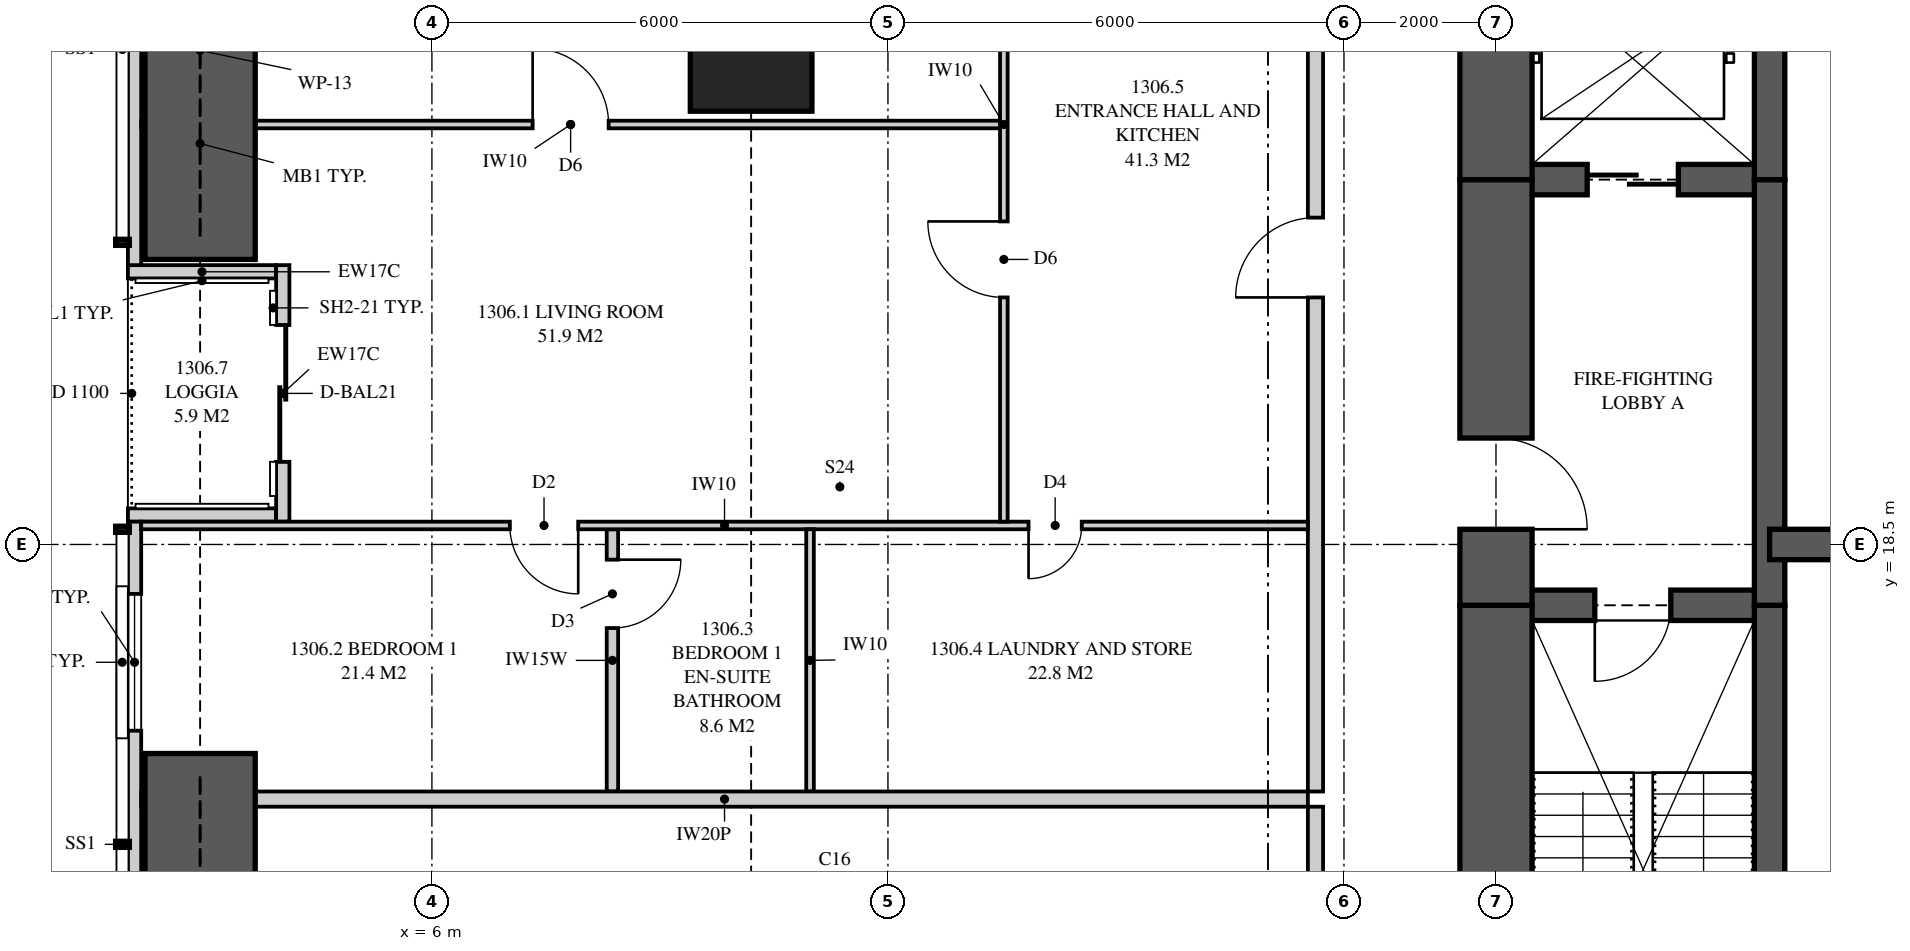
"""IFC4 building model, lengths in metres.
Left out: names, types, materials, properties, quantities, classifications, styles, units other than length and angle.
Written with IfcOpenShell. Run it as: python <this file> out.ifc"""

import sys

from ifc_helpers import new_model, si_unit, direction, frame, frame_2d, origin, origin_2d, place, context, subcontext, project, spatial, polyline, rectangle, outline, extrude, element, fill, save


model = new_model("IFC4")
c1 = context("Model", 3, precision=1e-05, world=origin(), true_north=direction((0.0, 1.0)))
c2 = subcontext(c1, "Body", "Model", "MODEL_VIEW")
j1 = project(units=[si_unit("LENGTHUNIT", "METRE"), si_unit("PLANEANGLEUNIT", "RADIAN")], contexts=[c1])
p1 = place(None, origin())
s1 = spatial("IfcSite", under=j1, at=p1, CompositionType="ELEMENT")
p2 = place(p1, origin())
s2 = spatial("IfcBuilding", under=s1, at=p2, CompositionType="ELEMENT")
p3 = place(p2, frame((0.0, 0.0, 51.15)))
s3 = spatial("IfcBuildingStorey", under=s2, at=p3, CompositionType="ELEMENT", Elevation=51.15)
p4 = place(p3, frame((10.2, 25.0, 0.0), z_axis=(0.0, 0.0, 1.0), x_axis=(1.0, 0.0, 0.0)))
e1 = element("IfcColumn", 1, at=p4, inside=s3, PredefinedType="COLUMN", context=c2, shape_type="SweptSolid", body=[
    extrude(rectangle(XDim=1.6, YDim=1.6, at=origin_2d()), origin(), (0.0, 0.0, 1.0), 3.35),
])
p5 = place(p3, frame((20.0, 26.05, 0.0), z_axis=(0.0, 0.0, 1.0), x_axis=(0.0, -1.0, 0.0)))
e2 = element("IfcWall", 2, at=p5, inside=s3, PredefinedType="SHEAR", context=c2, shape_type="SweptSolid", body=[
    extrude(rectangle(XDim=2.75, YDim=0.95, at=frame_2d((1.375, 0.0))), origin(), (0.0, 0.0, 1.0), 3.35),
])
p6 = place(p3, frame((20.0, 23.3, 0.0), z_axis=(0.0, 0.0, 1.0), x_axis=(0.0, -1.0, 0.0)))
e3 = element("IfcWall", 3, at=p6, inside=s3, PredefinedType="SHEAR", context=c2, shape_type="SweptSolid", body=[
    extrude(rectangle(XDim=5.6, YDim=0.95, at=frame_2d((2.8, 0.0))), origin(), (0.0, 0.0, 1.0), 3.35),
])
p7 = place(p6, frame((3.4, 0.0, 0.0)))
e4 = element("IfcOpeningElement", 4, at=p7, cuts=e3, PredefinedType="OPENING", context=c2, shape_type="SweptSolid", body=[
    extrude(rectangle(XDim=1.2, YDim=2.2, at=frame_2d((0.6, 1.1))), frame((0.0, 0.485, 0.0), z_axis=(0.0, -1.0, 0.0), x_axis=(1.0, 0.0, 0.0)), (0.0, 0.0, 1.0), 0.97),
])
p8 = place(p3, frame((20.0, 17.7, 0.0), z_axis=(0.0, 0.0, 1.0), x_axis=(0.0, -1.0, 0.0)))
e5 = element("IfcWall", 5, at=p8, inside=s3, PredefinedType="SHEAR", context=c2, shape_type="SweptSolid", body=[
    extrude(rectangle(XDim=4.7, YDim=0.95, at=frame_2d((2.35, 0.0))), origin(), (0.0, 0.0, 1.0), 3.35),
])
p9 = place(p3, frame((23.6, 10.95, 0.0), z_axis=(0.0, 0.0, 1.0), x_axis=(0.0, 1.0, 0.0)))
e6 = element("IfcWall", 6, at=p9, inside=s3, PredefinedType="SHEAR", context=c2, shape_type="SweptSolid", body=[
    extrude(rectangle(XDim=6.75, YDim=0.4, at=frame_2d((3.375, 0.0))), origin(), (0.0, 0.0, 1.0), 3.35),
])
p10 = place(p3, frame((23.6, 17.7, 0.0), z_axis=(0.0, 0.0, 1.0), x_axis=(0.0, 1.0, 0.0)))
e7 = element("IfcWall", 7, at=p10, inside=s3, PredefinedType="SHEAR", context=c2, shape_type="SweptSolid", body=[
    extrude(rectangle(XDim=5.6, YDim=0.4, at=frame_2d((2.8, 0.0))), origin(), (0.0, 0.0, 1.0), 3.35),
])
p11 = place(p3, frame((23.6, 23.3, 0.0), z_axis=(0.0, 0.0, 1.0), x_axis=(0.0, 1.0, 0.0)))
e8 = element("IfcWall", 8, at=p11, inside=s3, PredefinedType="SHEAR", context=c2, shape_type="SweptSolid", body=[
    extrude(rectangle(XDim=2.75, YDim=0.4, at=frame_2d((1.375, 0.0))), origin(), (0.0, 0.0, 1.0), 3.35),
])
p12 = place(p3, frame((20.0, 17.7, 0.0), z_axis=(0.0, 0.0, 1.0), x_axis=(1.0, 0.0, 0.0)))
e9 = element("IfcWall", 9, at=p12, inside=s3, PredefinedType="SHEAR", context=c2, shape_type="SweptSolid", body=[
    extrude(rectangle(XDim=3.6, YDim=0.4, at=frame_2d((1.8, 0.0))), origin(), (0.0, 0.0, 1.0), 3.35),
])
p13 = place(p12, frame((1.3, 0.0, 0.0)))
e10 = element("IfcOpeningElement", 10, at=p13, cuts=e9, PredefinedType="OPENING", context=c2, shape_type="SweptSolid", body=[
    extrude(rectangle(XDim=1.0, YDim=2.1, at=frame_2d((0.5, 1.05))), frame((0.0, 0.21, 0.0), z_axis=(0.0, -1.0, 0.0), x_axis=(1.0, 0.0, 0.0)), (0.0, 0.0, 1.0), 0.42),
])
p14 = place(p3, frame((20.0, 23.3, 0.0), z_axis=(0.0, 0.0, 1.0), x_axis=(1.0, 0.0, 0.0)))
e11 = element("IfcWall", 11, at=p14, inside=s3, PredefinedType="SHEAR", context=c2, shape_type="SweptSolid", body=[
    extrude(rectangle(XDim=3.6, YDim=0.4, at=frame_2d((1.8, 0.0))), origin(), (0.0, 0.0, 1.0), 3.35),
])
p15 = place(p14, frame((1.2, 0.0, 0.0)))
e12 = element("IfcOpeningElement", 12, at=p15, cuts=e11, PredefinedType="OPENING", context=c2, shape_type="SweptSolid", body=[
    extrude(rectangle(XDim=1.2, YDim=2.1, at=frame_2d((0.6, 1.05))), frame((0.0, 0.21, 0.0), z_axis=(0.0, -1.0, 0.0), x_axis=(1.0, 0.0, 0.0)), (0.0, 0.0, 1.0), 0.42),
])
p16 = place(p3, frame((23.6, 18.5, 0.0), z_axis=(0.0, 0.0, 1.0), x_axis=(1.0, 0.0, 0.0)))
e13 = element("IfcWall", 13, at=p16, inside=s3, PredefinedType="SHEAR", context=c2, shape_type="SweptSolid", body=[
    extrude(rectangle(XDim=2.4, YDim=0.4, at=frame_2d((1.2, 0.0))), origin(), (0.0, 0.0, 1.0), 3.35),
])
p17 = place(p3, frame((2.087, 34.949, 0.0), z_axis=(0.0, 0.0, 1.0), x_axis=(0.0, -1.0, 0.0)))
e14 = element("IfcWall", 14, at=p17, inside=s3, PredefinedType="SOLIDWALL", context=c2, shape_type="SweptSolid", body=[
    extrude(outline(polyline([(0.0, 0.0), (12.774, 0.0), (12.774, 2.15), (9.949, 2.15), (9.949, 3.11), (9.823, 3.11), (9.823, 2.15), (9.73, 2.15), (9.73, 3.11), (0.0, 3.11), (0.0, 0.0)])), frame((0.0, 0.087, 0.0), z_axis=(0.0, -1.0, 0.0), x_axis=(1.0, 0.0, 0.0)), (0.0, 0.0, 1.0), 0.175),
])
p18 = place(p17, frame((2.722, 0.0, 0.4)))
e15 = element("IfcOpeningElement", 15, at=p18, cuts=e14, PredefinedType="OPENING", context=c2, shape_type="SweptSolid", body=[
    extrude(rectangle(XDim=1.8, YDim=1.7, at=frame_2d((0.9, 0.85))), frame((0.0, 0.097, 0.0), z_axis=(0.0, -1.0, 0.0), x_axis=(1.0, 0.0, 0.0)), (0.0, 0.0, 1.0), 0.195),
])
p19 = place(p17, frame((5.899, 0.0, 0.4)))
e16 = element("IfcOpeningElement", 16, at=p19, cuts=e14, PredefinedType="OPENING", context=c2, shape_type="SweptSolid", body=[
    extrude(rectangle(XDim=1.2, YDim=1.7, at=frame_2d((0.6, 0.85))), frame((0.0, 0.097, 0.0), z_axis=(0.0, -1.0, 0.0), x_axis=(1.0, 0.0, 0.0)), (0.0, 0.0, 1.0), 0.195),
])
p20 = place(p3, frame((2.087, 18.8, 0.0), z_axis=(0.0, 0.0, 1.0), x_axis=(0.0, -1.0, 0.0)))
e17 = element("IfcWall", 17, at=p20, inside=s3, PredefinedType="SOLIDWALL", context=c2, shape_type="SweptSolid", body=[
    extrude(outline(polyline([(0.0, 0.0), (15.749, 0.0), (15.749, 3.11), (6.019, 3.11), (6.019, 2.15), (5.926, 2.15), (5.926, 3.11), (5.8, 3.11), (5.8, 2.15), (0.0, 2.15), (0.0, 0.0)])), frame((0.0, 0.087, 0.0), z_axis=(0.0, -1.0, 0.0), x_axis=(1.0, 0.0, 0.0)), (0.0, 0.0, 1.0), 0.175),
])
p21 = place(p20, frame((0.95, 0.0, 0.4)))
e18 = element("IfcOpeningElement", 18, at=p21, cuts=e17, PredefinedType="OPENING", context=c2, shape_type="SweptSolid", body=[
    extrude(rectangle(XDim=1.8, YDim=1.7, at=frame_2d((0.9, 0.85))), frame((0.0, 0.097, 0.0), z_axis=(0.0, -1.0, 0.0), x_axis=(1.0, 0.0, 0.0)), (0.0, 0.0, 1.0), 0.195),
])
p22 = place(p20, frame((8.69, 0.0, 0.4)))
e19 = element("IfcOpeningElement", 19, at=p22, cuts=e17, PredefinedType="OPENING", context=c2, shape_type="SweptSolid", body=[
    extrude(rectangle(XDim=1.2, YDim=1.7, at=frame_2d((0.6, 0.85))), frame((0.0, 0.097, 0.0), z_axis=(0.0, -1.0, 0.0), x_axis=(1.0, 0.0, 0.0)), (0.0, 0.0, 1.0), 0.195),
])
p23 = place(p20, frame((11.727, 0.0, 0.4)))
e20 = element("IfcOpeningElement", 20, at=p23, cuts=e17, PredefinedType="OPENING", context=c2, shape_type="SweptSolid", body=[
    extrude(rectangle(XDim=1.8, YDim=1.7, at=frame_2d((0.9, 0.85))), frame((0.0, 0.097, 0.0), z_axis=(0.0, -1.0, 0.0), x_axis=(1.0, 0.0, 0.0)), (0.0, 0.0, 1.0), 0.195),
])
p24 = place(p3, frame((4.038, 22.175, 0.0), z_axis=(0.0, 0.0, 1.0), x_axis=(0.0, -1.0, 0.0)))
e21 = element("IfcWall", 21, at=p24, inside=s3, PredefinedType="SOLIDWALL", context=c2, shape_type="SweptSolid", body=[
    extrude(rectangle(XDim=3.375, YDim=0.175, at=frame_2d((1.688, 0.0))), origin(), (0.0, 0.0, 1.0), 3.11),
])
p25 = place(p24, frame((0.788, 0.0, 0.0)))
e22 = element("IfcOpeningElement", 22, at=p25, cuts=e21, PredefinedType="OPENING", context=c2, shape_type="SweptSolid", body=[
    extrude(rectangle(XDim=1.8, YDim=2.1, at=frame_2d((0.9, 1.05))), frame((0.0, 0.097, 0.0), z_axis=(0.0, -1.0, 0.0), x_axis=(1.0, 0.0, 0.0)), (0.0, 0.0, 1.0), 0.195),
])
for number, where, z_axis, x_axis in (
    (23, (2.0, 22.087, 0.0), (0.0, 0.0, 1.0), (1.0, 0.0, 0.0)),
    (24, (2.0, 18.887, 0.0), (0.0, 0.0, 1.0), (1.0, 0.0, 0.0)),
):
    element("IfcWall", number, at=place(p3, frame(where, z_axis=z_axis, x_axis=x_axis)), inside=s3, PredefinedType="SOLIDWALL", context=c2, shape_type="SweptSolid", body=[
        extrude(outline(polyline([(0.0, 0.0), (1.95, 0.0), (1.95, 3.11), (1.75, 3.11), (1.75, 2.15), (0.15, 2.15), (0.15, 3.11), (0.0, 3.11), (0.0, 0.0)])), frame((0.0, 0.087, 0.0), z_axis=(0.0, -1.0, 0.0), x_axis=(1.0, 0.0, 0.0)), (0.0, 0.0, 1.0), 0.175),
    ])
p26 = place(p3, frame((2.175, 15.15, 0.0), z_axis=(0.0, 0.0, 1.0), x_axis=(1.0, 0.0, 0.0)))
e25 = element("IfcWall", 25, at=p26, inside=s3, PredefinedType="PARTITIONING", context=c2, shape_type="SweptSolid", body=[
    extrude(outline(polyline([(0.529, 2.15), (0.0, 2.15), (0.0, 0.0), (0.529, 0.0), (0.529, 0.034), (1.021, 0.034), (1.021, 0.0), (15.35, 0.0), (15.35, 3.11), (9.335, 3.11), (9.335, 2.51), (6.715, 2.51), (6.715, 3.11), (1.685, 3.11), (1.685, 2.15), (1.021, 2.15), (1.021, 2.116), (0.529, 2.116), (0.529, 2.15)])), frame((0.0, 0.1, 0.0), z_axis=(0.0, -1.0, 0.0), x_axis=(1.0, 0.0, 0.0)), (0.0, 0.0, 1.0), 0.2),
])
p27 = place(p3, frame((17.625, 15.25, 0.0), z_axis=(0.0, 0.0, 1.0), x_axis=(0.0, 1.0, 0.0)))
e26 = element("IfcWall", 26, at=p27, inside=s3, PredefinedType="PARTITIONING", context=c2, shape_type="SweptSolid", body=[
    extrude(outline(polyline([(0.0, 0.0), (14.0, 0.0), (14.0, 3.11), (10.087, 3.11), (10.087, 2.541), (9.413, 2.541), (9.413, 3.11), (0.0, 3.11), (0.0, 0.0)])), frame((0.0, 0.1, 0.0), z_axis=(0.0, -1.0, 0.0), x_axis=(1.0, 0.0, 0.0)), (0.0, 0.0, 1.0), 0.2),
])
p28 = place(p27, frame((6.5, 0.0, 0.0)))
e27 = element("IfcOpeningElement", 27, at=p28, cuts=e26, PredefinedType="OPENING", context=c2, shape_type="SweptSolid", body=[
    extrude(rectangle(XDim=1.05, YDim=2.2, at=frame_2d((0.525, 1.1))), frame((0.0, 0.11, 0.0), z_axis=(0.0, -1.0, 0.0), x_axis=(1.0, 0.0, 0.0)), (0.0, 0.0, 1.0), 0.22),
])
p29 = place(p3, frame((2.175, 18.75, 0.0), z_axis=(0.0, 0.0, 1.0), x_axis=(1.0, 0.0, 0.0)))
e28 = element("IfcWall", 28, at=p29, inside=s3, PredefinedType="PARTITIONING", context=c2, shape_type="SweptSolid", body=[
    extrude(outline(polyline([(0.0, 0.0), (15.35, 0.0), (15.35, 3.11), (9.285, 3.11), (9.285, 2.51), (6.765, 2.51), (6.765, 3.11), (1.635, 3.11), (1.635, 2.15), (0.0, 2.15), (0.0, 3.11), (0.0, 0.0)])), frame((0.0, 0.05, 0.0), z_axis=(0.0, -1.0, 0.0), x_axis=(1.0, 0.0, 0.0)), (0.0, 0.0, 1.0), 0.1),
])
p30 = place(p29, frame((4.85, 0.0, 0.0)))
e29 = element("IfcOpeningElement", 29, at=p30, cuts=e28, PredefinedType="OPENING", context=c2, shape_type="SweptSolid", body=[
    extrude(rectangle(XDim=0.9, YDim=2.1, at=frame_2d((0.45, 1.05))), frame((0.0, 0.06, 0.0), z_axis=(0.0, -1.0, 0.0), x_axis=(1.0, 0.0, 0.0)), (0.0, 0.0, 1.0), 0.12),
])
p31 = place(p29, frame((11.675, 0.0, 0.0)))
e30 = element("IfcOpeningElement", 30, at=p31, cuts=e28, PredefinedType="OPENING", context=c2, shape_type="SweptSolid", body=[
    extrude(rectangle(XDim=0.7, YDim=2.1, at=frame_2d((0.35, 1.05))), frame((0.0, 0.06, 0.0), z_axis=(0.0, -1.0, 0.0), x_axis=(1.0, 0.0, 0.0)), (0.0, 0.0, 1.0), 0.12),
])
p32 = place(p3, frame((8.375, 15.25, 0.0), z_axis=(0.0, 0.0, 1.0), x_axis=(0.0, 1.0, 0.0)))
e31 = element("IfcWall", 31, at=p32, inside=s3, PredefinedType="PLUMBINGWALL", context=c2, shape_type="SweptSolid", body=[
    extrude(rectangle(XDim=3.45, YDim=0.15, at=frame_2d((1.725, 0.0))), origin(), (0.0, 0.0, 1.0), 3.11),
])
p33 = place(p32, frame((2.15, 0.0, 0.0)))
e32 = element("IfcOpeningElement", 32, at=p33, cuts=e31, PredefinedType="OPENING", context=c2, shape_type="SweptSolid", body=[
    extrude(rectangle(XDim=0.9, YDim=2.1, at=frame_2d((0.45, 1.05))), frame((0.0, 0.085, 0.0), z_axis=(0.0, -1.0, 0.0), x_axis=(1.0, 0.0, 0.0)), (0.0, 0.0, 1.0), 0.17),
])
p34 = place(p3, frame((10.975, 15.25, 0.0), z_axis=(0.0, 0.0, 1.0), x_axis=(0.0, 1.0, 0.0)))
e33 = element("IfcWall", 33, at=p34, inside=s3, PredefinedType="PARTITIONING", context=c2, shape_type="SweptSolid", body=[
    extrude(outline(polyline([(0.0, 0.0), (3.45, 0.0), (3.45, 3.11), (3.45, 2.51), (0.0, 2.51), (0.0, 3.11), (0.0, 0.0)])), frame((0.0, 0.05, 0.0), z_axis=(0.0, -1.0, 0.0), x_axis=(1.0, 0.0, 0.0)), (0.0, 0.0, 1.0), 0.1),
])
p35 = place(p3, frame((13.525, 18.8, 0.0), z_axis=(0.0, 0.0, 1.0), x_axis=(0.0, 1.0, 0.0)))
e34 = element("IfcWall", 34, at=p35, inside=s3, PredefinedType="PARTITIONING", context=c2, shape_type="SweptSolid", body=[
    extrude(outline(polyline([(0.0, 0.0), (10.45, 0.0), (10.45, 3.11), (6.487, 3.11), (6.487, 2.541), (5.913, 2.541), (5.913, 3.11), (0.0, 3.11), (0.0, 0.0)])), frame((0.0, 0.05, 0.0), z_axis=(0.0, -1.0, 0.0), x_axis=(1.0, 0.0, 0.0)), (0.0, 0.0, 1.0), 0.1),
])
p36 = place(p35, frame((2.95, 0.0, 0.0)))
e35 = element("IfcOpeningElement", 35, at=p36, cuts=e34, PredefinedType="OPENING", context=c2, shape_type="SweptSolid", body=[
    extrude(rectangle(XDim=1.0, YDim=2.1, at=frame_2d((0.5, 1.05))), frame((0.0, 0.06, 0.0), z_axis=(0.0, -1.0, 0.0), x_axis=(1.0, 0.0, 0.0)), (0.0, 0.0, 1.0), 0.12),
])
p37 = place(p3, frame((2.175, 24.025, 0.0), z_axis=(0.0, 0.0, 1.0), x_axis=(1.0, 0.0, 0.0)))
e36 = element("IfcWall", 36, at=p37, inside=s3, PredefinedType="PARTITIONING", context=c2, shape_type="SweptSolid", body=[
    extrude(outline(polyline([(0.529, 2.15), (0.0, 2.15), (0.0, 0.0), (0.529, 0.0), (0.529, 0.803), (1.021, 0.803), (1.021, 0.0), (11.3, 0.0), (11.3, 3.11), (9.285, 3.11), (9.285, 2.51), (6.765, 2.51), (6.765, 3.11), (1.635, 3.11), (1.635, 2.15), (1.021, 2.15), (1.021, 1.347), (0.529, 1.347), (0.529, 2.15)])), frame((0.0, 0.05, 0.0), z_axis=(0.0, -1.0, 0.0), x_axis=(1.0, 0.0, 0.0)), (0.0, 0.0, 1.0), 0.1),
])
p38 = place(p37, frame((5.15, 0.0, 0.0)))
e37 = element("IfcOpeningElement", 37, at=p38, cuts=e36, PredefinedType="OPENING", context=c2, shape_type="SweptSolid", body=[
    extrude(rectangle(XDim=1.0, YDim=2.1, at=frame_2d((0.5, 1.05))), frame((0.0, 0.06, 0.0), z_axis=(0.0, -1.0, 0.0), x_axis=(1.0, 0.0, 0.0)), (0.0, 0.0, 1.0), 0.12),
])
p39 = place(p3, frame((17.625, 13.6, 0.0), z_axis=(0.0, 0.0, 1.0), x_axis=(0.0, 1.0, 0.0)))
e38 = element("IfcWall", 38, at=p39, inside=s3, PredefinedType="PARTITIONING", context=c2, shape_type="SweptSolid", body=[
    extrude(rectangle(XDim=1.45, YDim=0.2, at=frame_2d((0.725, 0.0))), origin(), (0.0, 0.0, 1.0), 3.11),
])
for number, where, z_axis, x_axis in (
    (39, (2.95, 22.25, 0.0), (0.0, 0.0, 1.0), (0.0, 1.0, 0.0)),
    (40, (2.95, 10.25, 0.0), (0.0, 0.0, 1.0), (0.0, 1.0, 0.0)),
):
    element("IfcWall", number, at=place(p3, frame(where, z_axis=z_axis, x_axis=x_axis)), inside=s3, PredefinedType="SHEAR", context=c2, shape_type="SweptSolid", body=[
        extrude(rectangle(XDim=5.5, YDim=1.45, at=frame_2d((2.75, 0.0))), origin(), (0.0, 0.0, 1.0), 3.35),
    ])
p40 = place(p25, origin())
e41 = element("IfcDoor", 41, at=p40, inside=s3, OperationType="SLIDING_TO_LEFT", PredefinedType="DOOR", context=c2, shape_type="SweptSolid", body=[
    extrude(rectangle(XDim=1.8, YDim=2.1, at=frame_2d((0.9, 1.05))), frame((0.0, 0.025, 0.0), z_axis=(0.0, -1.0, 0.0), x_axis=(1.0, 0.0, 0.0)), (0.0, 0.0, 1.0), 0.05),
])
fill(e22, e41)
p41 = place(p21, origin())
e42 = element("IfcWindow", 42, at=p41, inside=s3, PartitioningType="SINGLE_PANEL", PredefinedType="WINDOW", context=c2, shape_type="SweptSolid", body=[
    extrude(rectangle(XDim=1.8, YDim=1.7, at=frame_2d((0.9, 0.85))), frame((0.0, 0.03, 0.0), z_axis=(0.0, -1.0, 0.0), x_axis=(1.0, 0.0, 0.0)), (0.0, 0.0, 1.0), 0.06),
])
fill(e18, e42)
p42 = place(p28, origin())
e43 = element("IfcDoor", 43, at=p42, inside=s3, OperationType="SINGLE_SWING_LEFT", PredefinedType="DOOR", context=c2, shape_type="SweptSolid", body=[
    extrude(rectangle(XDim=1.05, YDim=2.2, at=frame_2d((0.525, 1.1))), frame((0.0, 0.025, 0.0), z_axis=(0.0, -1.0, 0.0), x_axis=(1.0, 0.0, 0.0)), (0.0, 0.0, 1.0), 0.05),
])
fill(e27, e43)
p43 = place(p30, frame((0.9, 0.0, 0.0), z_axis=(0.0, 0.0, 1.0), x_axis=(-1.0, 0.0, 0.0)))
e44 = element("IfcDoor", 44, at=p43, inside=s3, OperationType="SINGLE_SWING_LEFT", PredefinedType="DOOR", context=c2, shape_type="SweptSolid", body=[
    extrude(rectangle(XDim=0.9, YDim=2.1, at=frame_2d((0.45, 1.05))), frame((0.0, 0.025, 0.0), z_axis=(0.0, -1.0, 0.0), x_axis=(1.0, 0.0, 0.0)), (0.0, 0.0, 1.0), 0.05),
])
fill(e29, e44)
p44 = place(p33, frame((0.9, 0.0, 0.0), z_axis=(0.0, 0.0, 1.0), x_axis=(-1.0, 0.0, 0.0)))
e45 = element("IfcDoor", 45, at=p44, inside=s3, OperationType="SINGLE_SWING_LEFT", PredefinedType="DOOR", context=c2, shape_type="SweptSolid", body=[
    extrude(rectangle(XDim=0.9, YDim=2.1, at=frame_2d((0.45, 1.05))), frame((0.0, 0.025, 0.0), z_axis=(0.0, -1.0, 0.0), x_axis=(1.0, 0.0, 0.0)), (0.0, 0.0, 1.0), 0.05),
])
fill(e32, e45)
p45 = place(p31, frame((0.7, 0.0, 0.0), z_axis=(0.0, 0.0, 1.0), x_axis=(-1.0, 0.0, 0.0)))
e46 = element("IfcDoor", 46, at=p45, inside=s3, OperationType="SINGLE_SWING_RIGHT", PredefinedType="DOOR", context=c2, shape_type="SweptSolid", body=[
    extrude(rectangle(XDim=0.7, YDim=2.1, at=frame_2d((0.35, 1.05))), frame((0.0, 0.025, 0.0), z_axis=(0.0, -1.0, 0.0), x_axis=(1.0, 0.0, 0.0)), (0.0, 0.0, 1.0), 0.05),
])
fill(e30, e46)
p46 = place(p36, origin())
e47 = element("IfcDoor", 47, at=p46, inside=s3, OperationType="SINGLE_SWING_RIGHT", PredefinedType="DOOR", context=c2, shape_type="SweptSolid", body=[
    extrude(rectangle(XDim=1.0, YDim=2.1, at=frame_2d((0.5, 1.05))), frame((0.0, 0.025, 0.0), z_axis=(0.0, -1.0, 0.0), x_axis=(1.0, 0.0, 0.0)), (0.0, 0.0, 1.0), 0.05),
])
fill(e35, e47)
p47 = place(p38, origin())
e48 = element("IfcDoor", 48, at=p47, inside=s3, OperationType="SINGLE_SWING_LEFT", PredefinedType="DOOR", context=c2, shape_type="SweptSolid", body=[
    extrude(rectangle(XDim=1.0, YDim=2.1, at=frame_2d((0.5, 1.05))), frame((0.0, 0.025, 0.0), z_axis=(0.0, -1.0, 0.0), x_axis=(1.0, 0.0, 0.0)), (0.0, 0.0, 1.0), 0.05),
])
fill(e37, e48)
p48 = place(p13, frame((1.0, 0.0, 0.0), z_axis=(0.0, 0.0, 1.0), x_axis=(-1.0, 0.0, 0.0)))
e49 = element("IfcDoor", 49, at=p48, inside=s3, OperationType="SINGLE_SWING_RIGHT", PredefinedType="DOOR", context=c2, shape_type="SweptSolid", body=[
    extrude(rectangle(XDim=1.0, YDim=2.1, at=frame_2d((0.5, 1.05))), frame((0.0, 0.025, 0.0), z_axis=(0.0, -1.0, 0.0), x_axis=(1.0, 0.0, 0.0)), (0.0, 0.0, 1.0), 0.05),
])
fill(e10, e49)
p49 = place(p7, origin())
e50 = element("IfcDoor", 50, at=p49, inside=s3, OperationType="SINGLE_SWING_RIGHT", PredefinedType="DOOR", context=c2, shape_type="SweptSolid", body=[
    extrude(rectangle(XDim=1.2, YDim=2.2, at=frame_2d((0.6, 1.1))), frame((0.0, 0.025, 0.0), z_axis=(0.0, -1.0, 0.0), x_axis=(1.0, 0.0, 0.0)), (0.0, 0.0, 1.0), 0.05),
])
fill(e4, e50)
p50 = place(p15, origin())
e51 = element("IfcDoor", 51, at=p50, inside=s3, OperationType="SLIDING_TO_LEFT", PredefinedType="DOOR", context=c2, shape_type="SweptSolid", body=[
    extrude(rectangle(XDim=1.2, YDim=2.1, at=frame_2d((0.6, 1.05))), frame((0.0, 0.025, 0.0), z_axis=(0.0, -1.0, 0.0), x_axis=(1.0, 0.0, 0.0)), (0.0, 0.0, 1.0), 0.05),
])
fill(e12, e51)
save(model, sys.argv[1])
